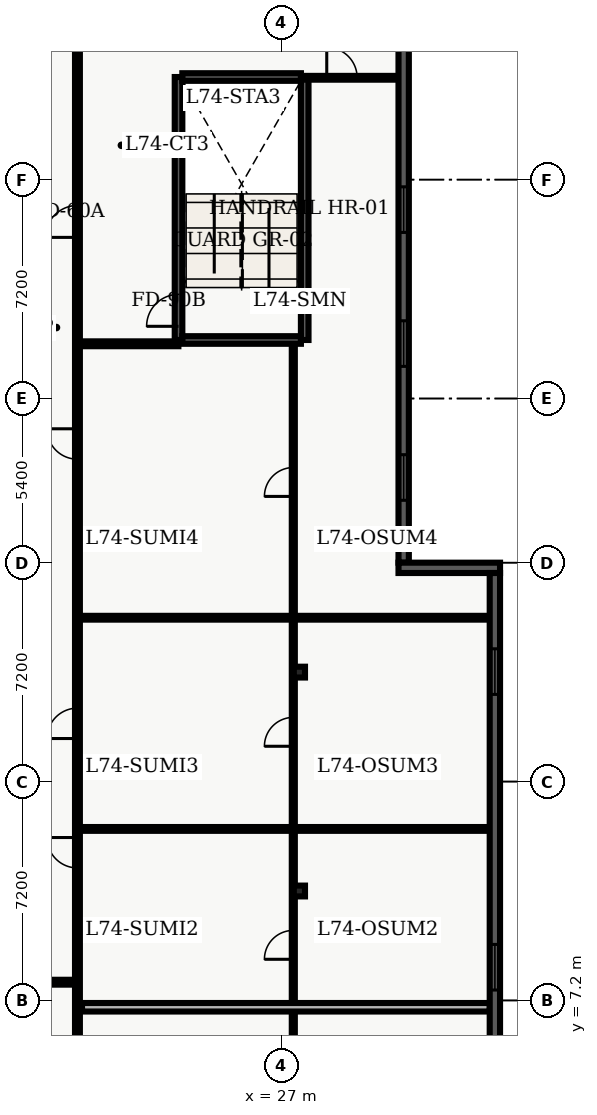
"""IFC4 building model, lengths in metres.
Left out: names, types, materials, properties, quantities, classifications, styles, units other than length and angle.
Written with IfcOpenShell. Run it as: python <this file> out.ifc"""

import sys

from ifc_helpers import new_model, entity, si_unit, converted_unit, direction, frame, origin_with_axes, origin_2d_with_axis, place, context, subcontext, project, spatial, polyline, rectangle, i_section, outline, extrude, element, fill, save


model = new_model("IFC4")
c1 = context("Model", 3, precision=1e-05, world=origin_with_axes(), true_north=direction((0.0, 1.0)))
c2 = subcontext(c1, "Body", "Model", "MODEL_VIEW")
j1 = project(units=[si_unit("LENGTHUNIT", "METRE"), converted_unit("PLANEANGLEUNIT", "DEGREE", entity("IfcPlaneAngleMeasure", 0.017), si_unit("PLANEANGLEUNIT", "RADIAN"), dimensions=[0, 0, 0, 0, 0, 0, 0])], contexts=[c1])
p1 = place(None, origin_with_axes())
s1 = spatial("IfcSite", under=j1, at=p1, CompositionType="ELEMENT")
p2 = place(p1, origin_with_axes())
s2 = spatial("IfcBuilding", under=s1, at=p2, CompositionType="ELEMENT")
p3 = place(p2, frame((0.0, 0.0, 299.7), z_axis=(0.0, 0.0, 1.0), x_axis=(1.0, 0.0, 0.0)))
s3 = spatial("IfcBuildingStorey", under=s2, at=p3, CompositionType="ELEMENT", Elevation=299.7)
p4 = place(p3, frame((23.625, 28.925, 0.0), z_axis=(0.0, 0.0, 1.0), x_axis=(0.0, 1.0, 0.0)))
e1 = element("IfcWall", 1, at=p4, inside=s3, PredefinedType="SHEAR", context=c2, shape_type="SweptSolid", body=[
    extrude(outline(polyline([(0.0, -0.125), (8.65, -0.125), (8.65, 0.125), (0.0, 0.125), (0.0, -0.125)])), origin_with_axes(), (0.0, 0.0, 1.0), 3.6),
])
p5 = place(p4, frame((0.975, 0.0, 0.0), z_axis=(0.0, 0.0, 1.0), x_axis=(1.0, 0.0, 0.0)))
e2 = element("IfcOpeningElement", 2, at=p5, cuts=e1, PredefinedType="OPENING", context=c2, shape_type="SweptSolid", body=[
    extrude(rectangle(XDim=1.05, YDim=0.27, at=origin_2d_with_axis()), origin_with_axes(), (0.0, 0.0, 1.0), 2.15),
])
p6 = place(p3, frame((27.775, 28.925, 0.0), z_axis=(0.0, 0.0, 1.0), x_axis=(0.0, 1.0, 0.0)))
e3 = element("IfcWall", 3, at=p6, inside=s3, PredefinedType="SHEAR", context=c2, shape_type="SweptSolid", body=[
    extrude(outline(polyline([(0.0, -0.125), (8.65, -0.125), (8.65, 0.125), (0.0, 0.125), (0.0, -0.125)])), origin_with_axes(), (0.0, 0.0, 1.0), 3.6),
])
for number, where, z_axis, x_axis in (
    (4, (23.75, 28.925, 0.0), (0.0, 0.0, 1.0), (1.0, 0.0, 0.0)),
    (5, (23.75, 37.575, 0.0), (0.0, 0.0, 1.0), (1.0, 0.0, 0.0)),
):
    element("IfcWall", number, at=place(p3, frame(where, z_axis=z_axis, x_axis=x_axis)), inside=s3, PredefinedType="SHEAR", context=c2, shape_type="SweptSolid", body=[
        extrude(outline(polyline([(0.0, -0.125), (3.9, -0.125), (3.9, 0.125), (0.0, 0.125), (0.0, -0.125)])), origin_with_axes(), (0.0, 0.0, 1.0), 3.6),
    ])
for number, where, z_axis, x_axis in (
    (6, (27.6, 10.8, 0.0), (0.0, 0.0, 1.0), (1.0, 0.0, 0.0)),
    (7, (27.6, 18.0, 0.0), (0.0, 0.0, 1.0), (1.0, 0.0, 0.0)),
):
    element("IfcColumn", number, at=place(p3, frame(where, z_axis=z_axis, x_axis=x_axis)), inside=s3, PredefinedType="COLUMN", context=c2, shape_type="SweptSolid", body=[
        extrude(i_section(OverallWidth=0.369, OverallDepth=0.356, WebThickness=0.011, FlangeThickness=0.018, FilletRadius=0.018, at=origin_2d_with_axis()), origin_with_axes(), (0.0, 0.0, 1.0), 3.9),
    ])
p7 = place(p3, frame((8.135, 7.8, 0.0), z_axis=(0.0, 0.0, 1.0), x_axis=(1.0, 0.0, 0.0)))
e8 = element("IfcWall", 8, at=p7, inside=s3, PredefinedType="PARTITIONING", context=c2, shape_type="SweptSolid", body=[
    extrude(outline(polyline([(0.0, -0.08), (12.165, -0.08), (12.165, 0.08), (0.0, 0.08), (0.0, -0.08)])), origin_with_axes(), (0.0, 0.0, 1.0), 2.64),
])
p8 = place(p7, frame((0.89, 0.0, 0.0), z_axis=(0.0, 0.0, 1.0), x_axis=(1.0, 0.0, 0.0)))
e9 = element("IfcOpeningElement", 9, at=p8, cuts=e8, PredefinedType="OPENING", context=c2, shape_type="SweptSolid", body=[
    extrude(rectangle(XDim=1.0, YDim=0.18, at=origin_2d_with_axis()), origin_with_axes(), (0.0, 0.0, 1.0), 2.15),
])
p9 = place(p7, frame((5.482, 0.0, 0.0), z_axis=(0.0, 0.0, 1.0), x_axis=(1.0, 0.0, 0.0)))
e10 = element("IfcOpeningElement", 10, at=p9, cuts=e8, PredefinedType="OPENING", context=c2, shape_type="SweptSolid", body=[
    extrude(rectangle(XDim=1.0, YDim=0.18, at=origin_2d_with_axis()), origin_with_axes(), (0.0, 0.0, 1.0), 2.15),
])
p10 = place(p7, frame((9.777, 0.0, 0.0), z_axis=(0.0, 0.0, 1.0), x_axis=(1.0, 0.0, 0.0)))
e11 = element("IfcOpeningElement", 11, at=p10, cuts=e8, PredefinedType="OPENING", context=c2, shape_type="SweptSolid", body=[
    extrude(rectangle(XDim=1.0, YDim=0.18, at=origin_2d_with_axis()), origin_with_axes(), (0.0, 0.0, 1.0), 2.15),
])
p11 = place(p3, frame((20.3, 2.14, 0.0), z_axis=(0.0, 0.0, 1.0), x_axis=(0.0, 1.0, 0.0)))
e12 = element("IfcWall", 12, at=p11, inside=s3, PredefinedType="PARTITIONING", context=c2, shape_type="SweptSolid", body=[
    extrude(outline(polyline([(0.0, -0.08), (38.36, -0.08), (38.36, 0.08), (0.0, 0.08), (0.0, -0.08)])), origin_with_axes(), (0.0, 0.0, 1.0), 2.64),
])
p12 = place(p11, frame((30.685, 0.0, 0.0), z_axis=(0.0, 0.0, 1.0), x_axis=(1.0, 0.0, 0.0)))
e13 = element("IfcOpeningElement", 13, at=p12, cuts=e12, PredefinedType="OPENING", context=c2, shape_type="SweptSolid", body=[
    extrude(rectangle(XDim=1.05, YDim=0.18, at=origin_2d_with_axis()), origin_with_axes(), (0.0, 0.0, 1.0), 2.15),
])
p13 = place(p11, frame((2.683, 0.0, 0.0), z_axis=(0.0, 0.0, 1.0), x_axis=(1.0, 0.0, 0.0)))
e14 = element("IfcOpeningElement", 14, at=p13, cuts=e12, PredefinedType="OPENING", context=c2, shape_type="SweptSolid", body=[
    extrude(rectangle(XDim=1.0, YDim=0.18, at=origin_2d_with_axis()), origin_with_axes(), (0.0, 0.0, 1.0), 2.15),
])
p14 = place(p11, frame((9.919, 0.0, 0.0), z_axis=(0.0, 0.0, 1.0), x_axis=(1.0, 0.0, 0.0)))
e15 = element("IfcOpeningElement", 15, at=p14, cuts=e12, PredefinedType="OPENING", context=c2, shape_type="SweptSolid", body=[
    extrude(rectangle(XDim=1.0, YDim=0.18, at=origin_2d_with_axis()), origin_with_axes(), (0.0, 0.0, 1.0), 2.15),
])
p15 = place(p11, frame((14.175, 0.0, 0.0), z_axis=(0.0, 0.0, 1.0), x_axis=(1.0, 0.0, 0.0)))
e16 = element("IfcOpeningElement", 16, at=p15, cuts=e12, PredefinedType="OPENING", context=c2, shape_type="SweptSolid", body=[
    extrude(rectangle(XDim=1.0, YDim=0.18, at=origin_2d_with_axis()), origin_with_axes(), (0.0, 0.0, 1.0), 2.15),
])
p16 = place(p11, frame((23.364, 0.0, 0.0), z_axis=(0.0, 0.0, 1.0), x_axis=(1.0, 0.0, 0.0)))
e17 = element("IfcOpeningElement", 17, at=p16, cuts=e12, PredefinedType="OPENING", context=c2, shape_type="SweptSolid", body=[
    extrude(rectangle(XDim=1.0, YDim=0.18, at=origin_2d_with_axis()), origin_with_axes(), (0.0, 0.0, 1.0), 2.15),
])
p17 = place(p3, frame((20.3, 28.8, 0.0), z_axis=(0.0, 0.0, 1.0), x_axis=(1.0, 0.0, 0.0)))
e18 = element("IfcWall", 18, at=p17, inside=s3, PredefinedType="PARTITIONING", context=c2, shape_type="SweptSolid", body=[
    extrude(outline(polyline([(0.0, -0.08), (3.32, -0.08), (3.32, 0.08), (0.0, 0.08), (0.0, -0.08)])), origin_with_axes(), (0.0, 0.0, 1.0), 2.64),
])
p18 = place(p3, frame((27.4, 2.135, 0.0), z_axis=(0.0, 0.0, 1.0), x_axis=(0.0, 1.0, 0.0)))
e19 = element("IfcWall", 19, at=p18, inside=s3, PredefinedType="PARTITIONING", context=c2, shape_type="SweptSolid", body=[
    extrude(outline(polyline([(0.0, -0.05), (26.515, -0.05), (26.515, 0.05), (0.0, 0.05), (0.0, -0.05)])), origin_with_axes(), (0.0, 0.0, 1.0), 2.64),
])
p19 = place(p18, frame((2.408, 0.0, 0.0), z_axis=(0.0, 0.0, 1.0), x_axis=(1.0, 0.0, 0.0)))
e20 = element("IfcOpeningElement", 20, at=p19, cuts=e19, PredefinedType="OPENING", context=c2, shape_type="SweptSolid", body=[
    extrude(rectangle(XDim=0.95, YDim=0.12, at=origin_2d_with_axis()), origin_with_axes(), (0.0, 0.0, 1.0), 2.15),
])
p20 = place(p18, frame((6.894, 0.0, 0.0), z_axis=(0.0, 0.0, 1.0), x_axis=(1.0, 0.0, 0.0)))
e21 = element("IfcOpeningElement", 21, at=p20, cuts=e19, PredefinedType="OPENING", context=c2, shape_type="SweptSolid", body=[
    extrude(rectangle(XDim=0.95, YDim=0.12, at=origin_2d_with_axis()), origin_with_axes(), (0.0, 0.0, 1.0), 2.15),
])
p21 = place(p18, frame((13.901, 0.0, 0.0), z_axis=(0.0, 0.0, 1.0), x_axis=(1.0, 0.0, 0.0)))
e22 = element("IfcOpeningElement", 22, at=p21, cuts=e19, PredefinedType="OPENING", context=c2, shape_type="SweptSolid", body=[
    extrude(rectangle(XDim=0.95, YDim=0.12, at=origin_2d_with_axis()), origin_with_axes(), (0.0, 0.0, 1.0), 2.15),
])
p22 = place(p18, frame((22.119, 0.0, 0.0), z_axis=(0.0, 0.0, 1.0), x_axis=(1.0, 0.0, 0.0)))
e23 = element("IfcOpeningElement", 23, at=p22, cuts=e19, PredefinedType="OPENING", context=c2, shape_type="SweptSolid", body=[
    extrude(rectangle(XDim=0.95, YDim=0.12, at=origin_2d_with_axis()), origin_with_axes(), (0.0, 0.0, 1.0), 2.15),
])
p23 = place(p3, frame((20.45, 6.976, 0.0), z_axis=(0.0, 0.0, 1.0), x_axis=(1.0, 0.0, 0.0)))
e24 = element("IfcWall", 24, at=p23, inside=s3, PredefinedType="PARTITIONING", context=c2, shape_type="SweptSolid", body=[
    extrude(outline(polyline([(0.0, -0.14), (13.415, -0.14), (13.415, 0.14), (0.0, 0.14), (0.0, -0.14)])), origin_with_axes(), (0.0, 0.0, 1.0), 2.64),
])
for number, where, z_axis, x_axis in (
    (25, (20.45, 12.842, 0.0), (0.0, 0.0, 1.0), (1.0, 0.0, 0.0)),
    (26, (20.45, 19.789, 0.0), (0.0, 0.0, 1.0), (1.0, 0.0, 0.0)),
):
    element("IfcWall", number, at=place(p3, frame(where, z_axis=z_axis, x_axis=x_axis)), inside=s3, PredefinedType="PARTITIONING", context=c2, shape_type="SweptSolid", body=[
        extrude(outline(polyline([(0.0, -0.062), (13.415, -0.062), (13.415, 0.062), (0.0, 0.062), (0.0, -0.062)])), origin_with_axes(), (0.0, 0.0, 1.0), 2.64),
    ])
p24 = place(p3, frame((27.85, 37.55, 0.0), z_axis=(0.0, 0.0, 1.0), x_axis=(1.0, 0.0, 0.0)))
e27 = element("IfcWall", 27, at=p24, inside=s3, PredefinedType="PARTITIONING", context=c2, shape_type="SweptSolid", body=[
    extrude(outline(polyline([(0.0, -0.062), (3.015, -0.062), (3.015, 0.062), (0.0, 0.062), (0.0, -0.062)])), origin_with_axes(), (0.0, 0.0, 1.0), 2.64),
])
p25 = place(p24, frame((1.15, 0.0, 0.0), z_axis=(0.0, 0.0, 1.0), x_axis=(1.0, 0.0, 0.0)))
e28 = element("IfcOpeningElement", 28, at=p25, cuts=e27, PredefinedType="OPENING", context=c2, shape_type="SweptSolid", body=[
    extrude(rectangle(XDim=1.0, YDim=0.145, at=origin_2d_with_axis()), origin_with_axes(), (0.0, 0.0, 1.0), 2.15),
])
p26 = place(p3, frame((31.03, 40.42, 0.0), z_axis=(0.0, 0.0, 1.0), x_axis=(0.0, -1.0, 0.0)))
e29 = element("IfcWall", 29, at=p26, inside=s3, PredefinedType="SOLIDWALL", context=c2, shape_type="SweptSolid", body=[
    extrude(outline(polyline([(0.0, -0.17), (18.82, -0.17), (18.82, 0.17), (0.0, 0.17), (0.0, -0.17)])), origin_with_axes(), (0.0, 0.0, 1.0), 3.6),
])
p27 = place(p26, frame((7.207, 0.0, 0.45), z_axis=(0.0, 0.0, 1.0), x_axis=(1.0, 0.0, 0.0)))
e30 = element("IfcOpeningElement", 30, at=p27, cuts=e29, PredefinedType="OPENING", context=c2, shape_type="SweptSolid", body=[
    extrude(rectangle(XDim=1.5, YDim=0.36, at=origin_2d_with_axis()), origin_with_axes(), (0.0, 0.0, 1.0), 2.1),
])
p28 = place(p26, frame((11.613, 0.0, 0.45), z_axis=(0.0, 0.0, 1.0), x_axis=(1.0, 0.0, 0.0)))
e31 = element("IfcOpeningElement", 31, at=p28, cuts=e29, PredefinedType="OPENING", context=c2, shape_type="SweptSolid", body=[
    extrude(rectangle(XDim=1.5, YDim=0.36, at=origin_2d_with_axis()), origin_with_axes(), (0.0, 0.0, 1.0), 2.1),
])
p29 = place(p26, frame((16.018, 0.0, 0.45), z_axis=(0.0, 0.0, 1.0), x_axis=(1.0, 0.0, 0.0)))
e32 = element("IfcOpeningElement", 32, at=p29, cuts=e29, PredefinedType="OPENING", context=c2, shape_type="SweptSolid", body=[
    extrude(rectangle(XDim=1.5, YDim=0.36, at=origin_2d_with_axis()), origin_with_axes(), (0.0, 0.0, 1.0), 2.1),
])
p30 = place(p3, frame((30.86, 21.43, 0.0), z_axis=(0.0, 0.0, 1.0), x_axis=(1.0, 0.0, 0.0)))
e33 = element("IfcWall", 33, at=p30, inside=s3, PredefinedType="SOLIDWALL", context=c2, shape_type="SweptSolid", body=[
    extrude(outline(polyline([(0.0, -0.17), (3.34, -0.17), (3.34, 0.17), (0.0, 0.17), (0.0, -0.17)])), origin_with_axes(), (0.0, 0.0, 1.0), 3.6),
])
p31 = place(p3, frame((34.03, 21.26, 0.0), z_axis=(0.0, 0.0, 1.0), x_axis=(0.0, -1.0, 0.0)))
e34 = element("IfcWall", 34, at=p31, inside=s3, PredefinedType="SOLIDWALL", context=c2, shape_type="SweptSolid", body=[
    extrude(outline(polyline([(0.0, -0.17), (17.06, -0.17), (17.06, 0.17), (0.0, 0.17), (0.0, -0.17)])), origin_with_axes(), (0.0, 0.0, 1.0), 3.6),
])
p32 = place(p31, frame((3.243, 0.0, 0.45), z_axis=(0.0, 0.0, 1.0), x_axis=(1.0, 0.0, 0.0)))
e35 = element("IfcOpeningElement", 35, at=p32, cuts=e34, PredefinedType="OPENING", context=c2, shape_type="SweptSolid", body=[
    extrude(rectangle(XDim=1.5, YDim=0.36, at=origin_2d_with_axis()), origin_with_axes(), (0.0, 0.0, 1.0), 2.1),
])
p33 = place(p31, frame((12.967, 0.0, 0.45), z_axis=(0.0, 0.0, 1.0), x_axis=(1.0, 0.0, 0.0)))
e36 = element("IfcOpeningElement", 36, at=p33, cuts=e34, PredefinedType="OPENING", context=c2, shape_type="SweptSolid", body=[
    extrude(rectangle(XDim=1.5, YDim=0.36, at=origin_2d_with_axis()), origin_with_axes(), (0.0, 0.0, 1.0), 2.1),
])
p34 = place(p4, frame((0.975, 0.0, 0.0), z_axis=(0.0, 0.0, 1.0), x_axis=(1.0, 0.0, 0.0)))
e37 = element("IfcDoor", 37, at=p34, inside=s3, OperationType="SINGLE_SWING_LEFT", PredefinedType="DOOR", context=c2, shape_type="SweptSolid", body=[
    extrude(rectangle(XDim=1.05, YDim=0.09, at=origin_2d_with_axis()), origin_with_axes(), (0.0, 0.0, 1.0), 2.15),
])
fill(e2, e37)
p35 = place(p11, frame((30.685, 0.0, 0.0), z_axis=(0.0, 0.0, 1.0), x_axis=(1.0, 0.0, 0.0)))
e38 = element("IfcDoor", 38, at=p35, inside=s3, OperationType="SINGLE_SWING_LEFT", PredefinedType="DOOR", context=c2, shape_type="SweptSolid", body=[
    extrude(rectangle(XDim=1.05, YDim=0.09, at=origin_2d_with_axis()), origin_with_axes(), (0.0, 0.0, 1.0), 2.15),
])
fill(e13, e38)
p36 = place(p18, frame((6.894, 0.0, 0.0), z_axis=(0.0, 0.0, 1.0), x_axis=(1.0, 0.0, 0.0)))
e39 = element("IfcDoor", 39, at=p36, inside=s3, OperationType="SINGLE_SWING_LEFT", PredefinedType="DOOR", context=c2, shape_type="SweptSolid", body=[
    extrude(rectangle(XDim=0.95, YDim=0.06, at=origin_2d_with_axis()), origin_with_axes(), (0.0, 0.0, 1.0), 2.15),
])
fill(e21, e39)
p37 = place(p11, frame((9.919, 0.0, 0.0), z_axis=(0.0, 0.0, 1.0), x_axis=(1.0, 0.0, 0.0)))
e40 = element("IfcDoor", 40, at=p37, inside=s3, OperationType="SINGLE_SWING_RIGHT", PredefinedType="DOOR", context=c2, shape_type="SweptSolid", body=[
    extrude(rectangle(XDim=1.0, YDim=0.09, at=origin_2d_with_axis()), origin_with_axes(), (0.0, 0.0, 1.0), 2.15),
])
fill(e15, e40)
p38 = place(p18, frame((13.901, 0.0, 0.0), z_axis=(0.0, 0.0, 1.0), x_axis=(1.0, 0.0, 0.0)))
e41 = element("IfcDoor", 41, at=p38, inside=s3, OperationType="SINGLE_SWING_LEFT", PredefinedType="DOOR", context=c2, shape_type="SweptSolid", body=[
    extrude(rectangle(XDim=0.95, YDim=0.06, at=origin_2d_with_axis()), origin_with_axes(), (0.0, 0.0, 1.0), 2.15),
])
fill(e22, e41)
p39 = place(p11, frame((14.175, 0.0, 0.0), z_axis=(0.0, 0.0, 1.0), x_axis=(1.0, 0.0, 0.0)))
e42 = element("IfcDoor", 42, at=p39, inside=s3, OperationType="SINGLE_SWING_LEFT", PredefinedType="DOOR", context=c2, shape_type="SweptSolid", body=[
    extrude(rectangle(XDim=1.0, YDim=0.09, at=origin_2d_with_axis()), origin_with_axes(), (0.0, 0.0, 1.0), 2.15),
])
fill(e16, e42)
p40 = place(p18, frame((22.119, 0.0, 0.0), z_axis=(0.0, 0.0, 1.0), x_axis=(1.0, 0.0, 0.0)))
e43 = element("IfcDoor", 43, at=p40, inside=s3, OperationType="SINGLE_SWING_LEFT", PredefinedType="DOOR", context=c2, shape_type="SweptSolid", body=[
    extrude(rectangle(XDim=0.95, YDim=0.06, at=origin_2d_with_axis()), origin_with_axes(), (0.0, 0.0, 1.0), 2.15),
])
fill(e23, e43)
p41 = place(p11, frame((23.364, 0.0, 0.0), z_axis=(0.0, 0.0, 1.0), x_axis=(1.0, 0.0, 0.0)))
e44 = element("IfcDoor", 44, at=p41, inside=s3, OperationType="SINGLE_SWING_RIGHT", PredefinedType="DOOR", context=c2, shape_type="SweptSolid", body=[
    extrude(rectangle(XDim=1.0, YDim=0.09, at=origin_2d_with_axis()), origin_with_axes(), (0.0, 0.0, 1.0), 2.15),
])
fill(e17, e44)
p42 = place(p24, frame((1.15, 0.0, 0.0), z_axis=(0.0, 0.0, 1.0), x_axis=(1.0, 0.0, 0.0)))
e45 = element("IfcDoor", 45, at=p42, inside=s3, OperationType="SINGLE_SWING_LEFT", PredefinedType="DOOR", context=c2, shape_type="SweptSolid", body=[
    extrude(rectangle(XDim=1.0, YDim=0.075, at=origin_2d_with_axis()), origin_with_axes(), (0.0, 0.0, 1.0), 2.15),
])
fill(e28, e45)
p43 = place(p26, frame((7.207, 0.0, 0.45), z_axis=(0.0, 0.0, 1.0), x_axis=(1.0, 0.0, 0.0)))
e46 = element("IfcWindow", 46, at=p43, inside=s3, PredefinedType="WINDOW", context=c2, shape_type="SweptSolid", body=[
    extrude(rectangle(XDim=1.5, YDim=0.09, at=origin_2d_with_axis()), origin_with_axes(), (0.0, 0.0, 1.0), 2.1),
])
fill(e30, e46)
p44 = place(p26, frame((11.613, 0.0, 0.45), z_axis=(0.0, 0.0, 1.0), x_axis=(1.0, 0.0, 0.0)))
e47 = element("IfcWindow", 47, at=p44, inside=s3, PredefinedType="WINDOW", context=c2, shape_type="SweptSolid", body=[
    extrude(rectangle(XDim=1.5, YDim=0.09, at=origin_2d_with_axis()), origin_with_axes(), (0.0, 0.0, 1.0), 2.1),
])
fill(e31, e47)
p45 = place(p26, frame((16.018, 0.0, 0.45), z_axis=(0.0, 0.0, 1.0), x_axis=(1.0, 0.0, 0.0)))
e48 = element("IfcWindow", 48, at=p45, inside=s3, PredefinedType="WINDOW", context=c2, shape_type="SweptSolid", body=[
    extrude(rectangle(XDim=1.5, YDim=0.09, at=origin_2d_with_axis()), origin_with_axes(), (0.0, 0.0, 1.0), 2.1),
])
fill(e32, e48)
p46 = place(p31, frame((3.243, 0.0, 0.45), z_axis=(0.0, 0.0, 1.0), x_axis=(1.0, 0.0, 0.0)))
e49 = element("IfcWindow", 49, at=p46, inside=s3, PredefinedType="WINDOW", context=c2, shape_type="SweptSolid", body=[
    extrude(rectangle(XDim=1.5, YDim=0.09, at=origin_2d_with_axis()), origin_with_axes(), (0.0, 0.0, 1.0), 2.1),
])
fill(e35, e49)
p47 = place(p31, frame((12.967, 0.0, 0.45), z_axis=(0.0, 0.0, 1.0), x_axis=(1.0, 0.0, 0.0)))
e50 = element("IfcWindow", 50, at=p47, inside=s3, PredefinedType="WINDOW", context=c2, shape_type="SweptSolid", body=[
    extrude(rectangle(XDim=1.5, YDim=0.09, at=origin_2d_with_axis()), origin_with_axes(), (0.0, 0.0, 1.0), 2.1),
])
fill(e36, e50)
save(model, sys.argv[1])
